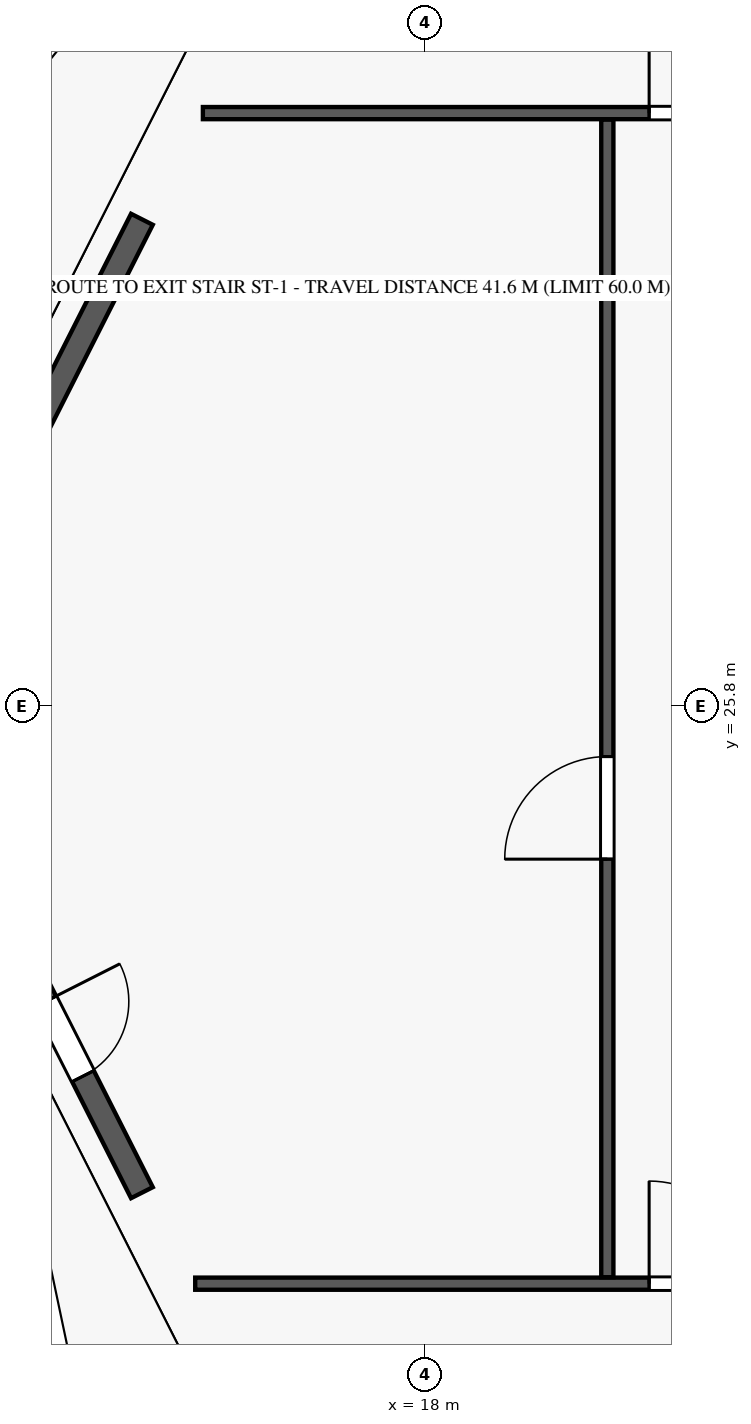
"""IFC4 building model, lengths in metres.
Left out: names, types, materials, properties, quantities, classifications, styles, units other than length and angle.
Written with IfcOpenShell. Run it as: python <this file> out.ifc"""

import sys

from ifc_helpers import new_model, si_unit, direction, frame, frame_2d, origin, origin_2d, place, context, subcontext, project, spatial, rectangle, extrude, element, fill, save


model = new_model("IFC4")
c1 = context("Model", 3, precision=1e-05, world=origin(), true_north=direction((0.0, 1.0)))
c2 = subcontext(c1, "Body", "Model", "MODEL_VIEW")
j1 = project(units=[si_unit("LENGTHUNIT", "METRE"), si_unit("PLANEANGLEUNIT", "RADIAN")], contexts=[c1])
p1 = place(None, origin())
s1 = spatial("IfcSite", under=j1, at=p1, CompositionType="ELEMENT")
p2 = place(p1, origin())
s2 = spatial("IfcBuilding", under=s1, at=p2, CompositionType="ELEMENT")
p3 = place(p2, frame((0.0, 0.0, 278.1)))
s3 = spatial("IfcBuildingStorey", under=s2, at=p3, CompositionType="ELEMENT", Elevation=278.1)
for number, where, z_axis, x_axis in (
    (1, (14.536, 32.567, 0.0), (0.0, 0.0, 1.0), (1.0, 0.0, 0.0)),
    (2, (14.536, 19.033, 0.0), (0.0, 0.0, 1.0), (1.0, 0.0, 0.0)),
):
    element("IfcColumn", number, at=place(p3, frame(where, z_axis=z_axis, x_axis=x_axis)), inside=s3, PredefinedType="COLUMN", context=c2, shape_type="SweptSolid", body=[
        extrude(rectangle(XDim=0.65, YDim=0.65, at=origin_2d()), origin(), (0.0, 0.0, 1.0), 5.4),
    ])
p4 = place(p3, frame((14.978, 18.2, 0.0), z_axis=(0.0, 0.0, 1.0), x_axis=(1.0, 0.0, 0.0)))
e3 = element("IfcWall", 3, at=p4, inside=s3, PredefinedType="PARTITIONING", context=c2, shape_type="SweptSolid", body=[
    extrude(rectangle(XDim=34.844, YDim=0.16, at=frame_2d((17.422, 0.0))), origin(), (0.0, 0.0, 1.0), 5.2),
])
p5 = place(p4, frame((5.972, 0.0, 0.0)))
e4 = element("IfcOpeningElement", 4, at=p5, cuts=e3, PredefinedType="OPENING", context=c2, shape_type="SweptSolid", body=[
    extrude(rectangle(XDim=1.35, YDim=2.35, at=frame_2d((0.675, 1.175))), frame((0.0, 0.09, 0.0), z_axis=(0.0, -1.0, 0.0), x_axis=(1.0, 0.0, 0.0)), (0.0, 0.0, 1.0), 0.18),
])
p6 = place(p4, frame((27.722, 0.0, 0.0)))
e5 = element("IfcOpeningElement", 5, at=p6, cuts=e3, PredefinedType="OPENING", context=c2, shape_type="SweptSolid", body=[
    extrude(rectangle(XDim=1.35, YDim=2.35, at=frame_2d((0.675, 1.175))), frame((0.0, 0.09, 0.0), z_axis=(0.0, -1.0, 0.0), x_axis=(1.0, 0.0, 0.0)), (0.0, 0.0, 1.0), 0.18),
])
p7 = place(p3, frame((20.4, 18.285, 0.0), z_axis=(0.0, 0.0, 1.0), x_axis=(0.0, 1.0, 0.0)))
e6 = element("IfcWall", 6, at=p7, inside=s3, PredefinedType="PARTITIONING", context=c2, shape_type="SweptSolid", body=[
    extrude(rectangle(XDim=15.23, YDim=0.16, at=frame_2d((7.615, 0.0))), origin(), (0.0, 0.0, 1.0), 4.887),
])
p8 = place(p7, frame((5.5, 0.0, 0.0)))
e7 = element("IfcOpeningElement", 7, at=p8, cuts=e6, PredefinedType="OPENING", context=c2, shape_type="SweptSolid", body=[
    extrude(rectangle(XDim=1.35, YDim=2.35, at=frame_2d((0.675, 1.175))), frame((0.0, 0.09, 0.0), z_axis=(0.0, -1.0, 0.0), x_axis=(1.0, 0.0, 0.0)), (0.0, 0.0, 1.0), 0.18),
])
p9 = place(p3, frame((15.079, 33.6, 0.0), z_axis=(0.0, 0.0, 1.0), x_axis=(1.0, 0.0, 0.0)))
e8 = element("IfcWall", 8, at=p9, inside=s3, PredefinedType="PARTITIONING", context=c2, shape_type="SweptSolid", body=[
    extrude(rectangle(XDim=34.642, YDim=0.16, at=frame_2d((17.321, 0.0))), origin(), (0.0, 0.0, 1.0), 5.2),
])
p10 = place(p9, frame((5.871, 0.0, 0.0)))
e9 = element("IfcOpeningElement", 9, at=p10, cuts=e8, PredefinedType="OPENING", context=c2, shape_type="SweptSolid", body=[
    extrude(rectangle(XDim=1.35, YDim=2.35, at=frame_2d((0.675, 1.175))), frame((0.0, 0.09, 0.0), z_axis=(0.0, -1.0, 0.0), x_axis=(1.0, 0.0, 0.0)), (0.0, 0.0, 1.0), 0.18),
])
p11 = place(p9, frame((27.271, 0.0, 0.0)))
e10 = element("IfcOpeningElement", 10, at=p11, cuts=e8, PredefinedType="OPENING", context=c2, shape_type="SweptSolid", body=[
    extrude(rectangle(XDim=1.35, YDim=2.35, at=frame_2d((0.675, 1.175))), frame((0.0, 0.09, 0.0), z_axis=(0.0, -1.0, 0.0), x_axis=(1.0, 0.0, 0.0)), (0.0, 0.0, 1.0), 0.18),
])
p12 = place(p3, frame((14.277, 32.203, 0.0), z_axis=(0.0, 0.0, 1.0), x_axis=(-0.451557557387, -0.892241992044, 0.0)))
e11 = element("IfcWall", 11, at=p12, inside=s3, PredefinedType="STANDARD", context=c2, shape_type="SweptSolid", body=[
    extrude(rectangle(XDim=4.536, YDim=0.32, at=frame_2d((2.268, 0.0))), origin(), (0.0, 0.0, 1.0), 4.39),
])
p13 = place(p12, frame((1.493, 0.0, 0.75)))
e12 = element("IfcOpeningElement", 12, at=p13, cuts=e11, PredefinedType="OPENING", context=c2, shape_type="SweptSolid", body=[
    extrude(rectangle(XDim=1.55, YDim=2.05, at=frame_2d((0.775, 1.025))), frame((0.0, 0.17, 0.0), z_axis=(0.0, -1.0, 0.0), x_axis=(1.0, 0.0, 0.0)), (0.0, 0.0, 1.0), 0.34),
])
p14 = place(p3, frame((12.229, 23.444, 0.0), z_axis=(0.0, 0.0, 1.0), x_axis=(0.451535871335, -0.892252966875, 0.0)))
e13 = element("IfcWall", 13, at=p14, inside=s3, PredefinedType="STANDARD", context=c2, shape_type="SweptSolid", body=[
    extrude(rectangle(XDim=4.536, YDim=0.32, at=frame_2d((2.268, 0.0))), origin(), (0.0, 0.0, 1.0), 4.39),
])
p15 = place(p14, frame((1.718, 0.0, 0.0)))
e14 = element("IfcOpeningElement", 14, at=p15, cuts=e13, PredefinedType="OPENING", context=c2, shape_type="SweptSolid", body=[
    extrude(rectangle(XDim=1.1, YDim=2.25, at=frame_2d((0.55, 1.125))), frame((0.0, 0.17, 0.0), z_axis=(0.0, -1.0, 0.0), x_axis=(1.0, 0.0, 0.0)), (0.0, 0.0, 1.0), 0.34),
])
p16 = place(p5, origin())
e15 = element("IfcDoor", 15, at=p16, inside=s3, OperationType="SINGLE_SWING_LEFT", PredefinedType="DOOR", context=c2, shape_type="SweptSolid", body=[
    extrude(rectangle(XDim=1.35, YDim=2.35, at=frame_2d((0.675, 1.175))), frame((0.0, 0.025, 0.0), z_axis=(0.0, -1.0, 0.0), x_axis=(1.0, 0.0, 0.0)), (0.0, 0.0, 1.0), 0.05),
])
fill(e4, e15)
p17 = place(p8, origin())
e16 = element("IfcDoor", 16, at=p17, inside=s3, OperationType="SINGLE_SWING_LEFT", PredefinedType="DOOR", context=c2, shape_type="SweptSolid", body=[
    extrude(rectangle(XDim=1.35, YDim=2.35, at=frame_2d((0.675, 1.175))), frame((0.0, 0.025, 0.0), z_axis=(0.0, -1.0, 0.0), x_axis=(1.0, 0.0, 0.0)), (0.0, 0.0, 1.0), 0.05),
])
fill(e7, e16)
p18 = place(p10, origin())
e17 = element("IfcDoor", 17, at=p18, inside=s3, OperationType="SINGLE_SWING_LEFT", PredefinedType="DOOR", context=c2, shape_type="SweptSolid", body=[
    extrude(rectangle(XDim=1.35, YDim=2.35, at=frame_2d((0.675, 1.175))), frame((0.0, 0.025, 0.0), z_axis=(0.0, -1.0, 0.0), x_axis=(1.0, 0.0, 0.0)), (0.0, 0.0, 1.0), 0.05),
])
fill(e9, e17)
p19 = place(p13, origin())
e18 = element("IfcWindow", 18, at=p19, inside=s3, PartitioningType="SINGLE_PANEL", PredefinedType="WINDOW", context=c2, shape_type="SweptSolid", body=[
    extrude(rectangle(XDim=1.55, YDim=2.05, at=frame_2d((0.775, 1.025))), frame((0.0, 0.03, 0.0), z_axis=(0.0, -1.0, 0.0), x_axis=(1.0, 0.0, 0.0)), (0.0, 0.0, 1.0), 0.06),
])
fill(e12, e18)
p20 = place(p15, origin())
e19 = element("IfcDoor", 19, at=p20, inside=s3, OperationType="SINGLE_SWING_LEFT", PredefinedType="DOOR", context=c2, shape_type="SweptSolid", body=[
    extrude(rectangle(XDim=1.1, YDim=2.25, at=frame_2d((0.55, 1.125))), frame((0.0, 0.025, 0.0), z_axis=(0.0, -1.0, 0.0), x_axis=(1.0, 0.0, 0.0)), (0.0, 0.0, 1.0), 0.05),
])
fill(e14, e19)
save(model, sys.argv[1])
